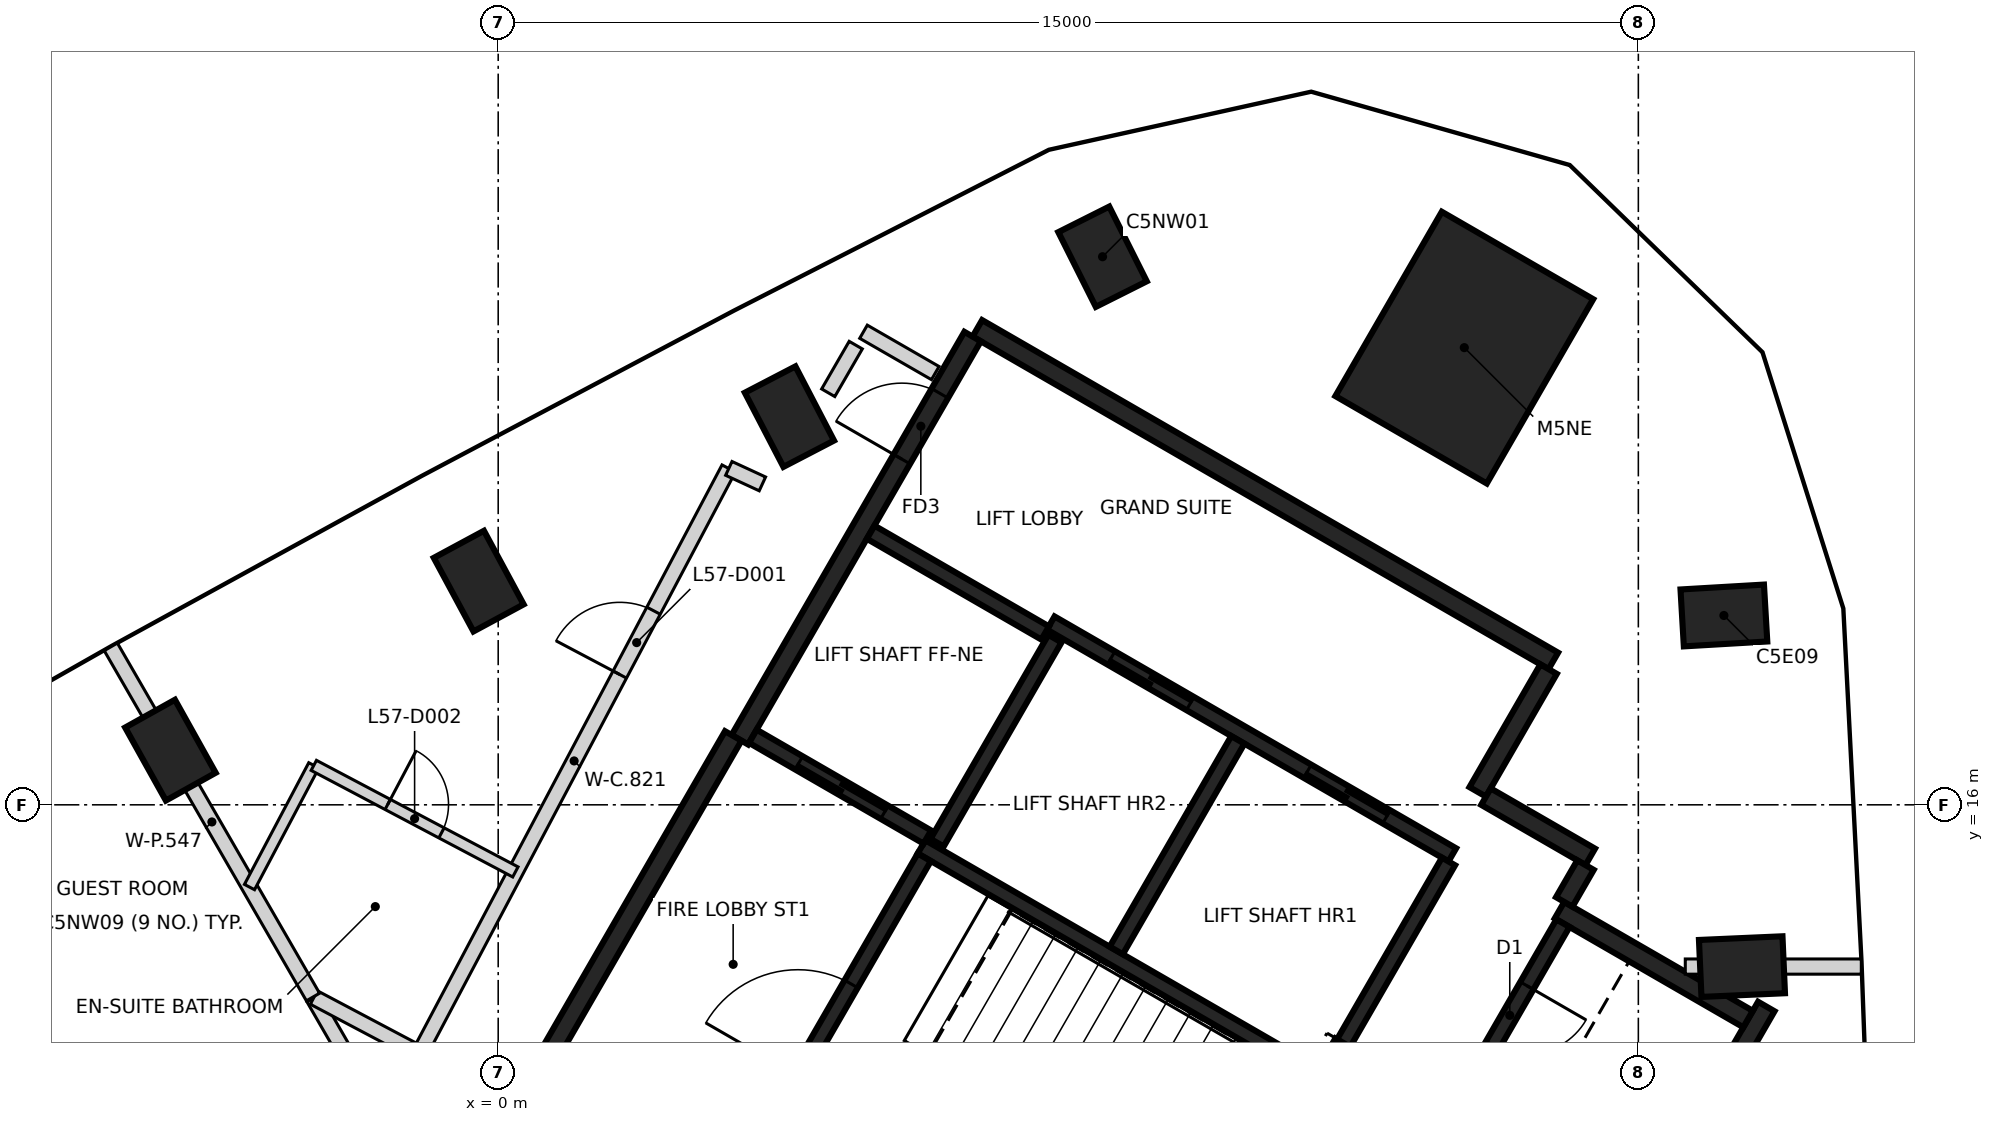
"""IFC4 building model, lengths in metres.
Left out: names, types, materials, properties, quantities, classifications, styles, units other than length and angle.
Written with IfcOpenShell. Run it as: python <this file> out.ifc"""

import sys

from ifc_helpers import new_model, si_unit, direction, frame, frame_2d, origin, origin_2d, place, context, subcontext, project, spatial, rectangle, extrude, element, fill, save


model = new_model("IFC4")
c1 = context("Model", 3, precision=1e-05, world=origin(), true_north=direction((0.0, 1.0)))
c2 = subcontext(c1, "Body", "Model", "MODEL_VIEW")
j1 = project(units=[si_unit("LENGTHUNIT", "METRE"), si_unit("PLANEANGLEUNIT", "RADIAN")], contexts=[c1])
p1 = place(None, origin())
s1 = spatial("IfcSite", under=j1, at=p1, CompositionType="ELEMENT")
p2 = place(p1, origin())
s2 = spatial("IfcBuilding", under=s1, at=p2, CompositionType="ELEMENT")
p3 = place(p2, frame((0.0, 0.0, 228.6)))
s3 = spatial("IfcBuildingStorey", under=s2, at=p3, CompositionType="ELEMENT", Elevation=228.6)
for number, where, z_axis, x_axis in (
    (1, (16.363, 13.872, -0.35), (0.0, 0.0, 1.0), (0.999, 0.044, 0.0)),
    (2, (16.125, 18.491, -0.35), (0.0, 0.0, 1.0), (0.998, 0.058, 0.0)),
    (3, (7.951, 23.211, -0.35), (0.0, 0.0, 1.0), (-0.449, 0.894, 0.0)),
    (4, (3.832, 21.107, -0.35), (0.0, 0.0, 1.0), (-0.461, 0.887, 0.0)),
    (5, (-0.256, 18.943, -0.35), (0.0, 0.0, 1.0), (-0.475, 0.88, 0.0)),
    (6, (-4.312, 16.719, -0.35), (0.0, 0.0, 1.0), (-0.487, 0.873, 0.0)),
):
    element("IfcColumn", number, at=place(p3, frame(where, z_axis=z_axis, x_axis=x_axis)), inside=s3, PredefinedType="COLUMN", context=c2, shape_type="SweptSolid", body=[
        extrude(rectangle(XDim=1.1, YDim=0.75, at=origin_2d()), origin(), (0.0, 0.0, 1.0), 3.6),
    ])
p4 = place(p3, frame((12.71, 22.015, -0.35), z_axis=(0.0, 0.0, 1.0), x_axis=(0.5, 0.866025403784, 0.0)))
e7 = element("IfcColumn", 7, at=p4, inside=s3, PredefinedType="COLUMN", context=c2, shape_type="SweptSolid", body=[
    extrude(rectangle(XDim=2.8, YDim=2.3, at=origin_2d()), origin(), (0.0, 0.0, 1.0), 3.6),
])
p5 = place(p3, frame((6.304, 22.269, 0.0), z_axis=(0.0, 0.0, 1.0), x_axis=(0.866022959057, -0.500004234368, 0.0)))
e8 = element("IfcWall", 8, at=p5, inside=s3, PredefinedType="SHEAR", context=c2, shape_type="SweptSolid", body=[
    extrude(rectangle(XDim=8.75, YDim=0.25, at=frame_2d((4.375, 0.0))), origin(), (0.0, 0.0, 1.0), 3.25),
])
p6 = place(p3, frame((3.179, 16.856, 0.0), z_axis=(0.0, 0.0, 1.0), x_axis=(0.500001955336, 0.866024274868, 0.0)))
e9 = element("IfcWall", 9, at=p6, inside=s3, PredefinedType="SHEAR", context=c2, shape_type="SweptSolid", body=[
    extrude(rectangle(XDim=6.125, YDim=0.25, at=frame_2d((3.062, 0.0))), origin(), (0.0, 0.0, 1.0), 3.25),
])
p7 = place(p6, frame((4.263, 0.0, 0.0)))
e10 = element("IfcOpeningElement", 10, at=p7, cuts=e9, PredefinedType="OPENING", context=c2, shape_type="SweptSolid", body=[
    extrude(rectangle(XDim=1.0, YDim=2.1, at=frame_2d((0.5, 1.05))), frame((0.0, 0.135, 0.0), z_axis=(0.0, -1.0, 0.0), x_axis=(1.0, 0.0, 0.0)), (0.0, 0.0, 1.0), 0.27),
])
p8 = place(p3, frame((0.48, 12.381, 0.0), z_axis=(0.0, 0.0, 1.0), x_axis=(0.49999885962, 0.866026062182, 0.0)))
e11 = element("IfcWall", 11, at=p8, inside=s3, PredefinedType="SHEAR", context=c2, shape_type="SweptSolid", body=[
    extrude(rectangle(XDim=5.225, YDim=0.25, at=frame_2d((2.612, 0.0))), origin(), (0.0, 0.0, 1.0), 3.25),
])
p9 = place(p3, frame((16.684, 13.347, 0.0), z_axis=(0.0, 0.0, 1.0), x_axis=(-0.499998874531, -0.866026053573, 0.0)))
e12 = element("IfcWall", 12, at=p9, inside=s3, PredefinedType="SHEAR", context=c2, shape_type="SweptSolid", body=[
    extrude(rectangle(XDim=3.313, YDim=0.25, at=frame_2d((1.656, 0.0))), origin(), (0.0, 0.0, 1.0), 3.25),
])
p10 = place(p3, frame((13.963, 14.614, 0.0), z_axis=(0.0, 0.0, 1.0), x_axis=(0.866042235819, -0.499970844928, 0.0)))
e13 = element("IfcWall", 13, at=p10, inside=s3, PredefinedType="SHEAR", context=c2, shape_type="SweptSolid", body=[
    extrude(rectangle(XDim=2.865, YDim=0.25, at=frame_2d((1.432, 0.0))), origin(), (0.0, 0.0, 1.0), 3.25),
])
p11 = place(p3, frame((13.819, 17.785, 0.0), z_axis=(0.0, 0.0, 1.0), x_axis=(-0.500039802285, -0.866002422705, 0.0)))
e14 = element("IfcWall", 14, at=p11, inside=s3, PredefinedType="SHEAR", context=c2, shape_type="SweptSolid", body=[
    extrude(rectangle(XDim=1.865, YDim=0.25, at=frame_2d((0.932, 0.0))), origin(), (0.0, 0.0, 1.0), 3.25),
])
p12 = place(p3, frame((12.433, 11.964, 0.0), z_axis=(0.0, 0.0, 1.0), x_axis=(-0.866038183914, 0.499977863513, 0.0)))
e15 = element("IfcWall", 15, at=p12, inside=s3, PredefinedType="SHEAR", context=c2, shape_type="SweptSolid", body=[
    extrude(rectangle(XDim=1.71, YDim=0.25, at=frame_2d((0.855, 0.0))), origin(), (0.0, 0.0, 1.0), 3.25),
])
p13 = place(p3, frame((12.995, 16.108, 0.0), z_axis=(0.0, 0.0, 1.0), x_axis=(0.866044474677, -0.49996696679, 0.0)))
e16 = element("IfcWall", 16, at=p13, inside=s3, PredefinedType="SHEAR", context=c2, shape_type="SweptSolid", body=[
    extrude(rectangle(XDim=1.584, YDim=0.25, at=frame_2d((0.792, 0.0))), origin(), (0.0, 0.0, 1.0), 3.25),
])
p14 = place(p3, frame((14.305, 15.207, 0.0), z_axis=(0.0, 0.0, 1.0), x_axis=(-0.499848422343, -0.866112899501, 0.0)))
e17 = element("IfcWall", 17, at=p14, inside=s3, PredefinedType="SHEAR", context=c2, shape_type="SweptSolid", body=[
    extrude(rectangle(XDim=0.559, YDim=0.25, at=frame_2d((0.28, 0.0))), origin(), (0.0, 0.0, 1.0), 3.25),
])
p15 = place(p3, frame((12.552, 15.342, 0.0), z_axis=(0.0, 0.0, 1.0), x_axis=(-0.866030299012, 0.499991521122, 0.0)))
e18 = element("IfcWall", 18, at=p15, inside=s3, PredefinedType="SHEAR", context=c2, shape_type="SweptSolid", body=[
    extrude(rectangle(XDim=6.1, YDim=0.2, at=frame_2d((3.05, 0.0))), origin(), (0.0, 0.0, 1.0), 3.25),
])
p16 = place(p15, frame((1.0, 0.0, 0.0)))
e19 = element("IfcOpeningElement", 19, at=p16, cuts=e18, PredefinedType="OPENING", context=c2, shape_type="SweptSolid", body=[
    extrude(rectangle(XDim=1.2, YDim=2.1, at=frame_2d((0.6, 1.05))), frame((0.0, 0.11, 0.0), z_axis=(0.0, -1.0, 0.0), x_axis=(1.0, 0.0, 0.0)), (0.0, 0.0, 1.0), 0.22),
])
p17 = place(p15, frame((3.982, 0.0, 0.0)))
e20 = element("IfcOpeningElement", 20, at=p17, cuts=e18, PredefinedType="OPENING", context=c2, shape_type="SweptSolid", body=[
    extrude(rectangle(XDim=1.2, YDim=2.1, at=frame_2d((0.6, 1.05))), frame((0.0, 0.11, 0.0), z_axis=(0.0, -1.0, 0.0), x_axis=(1.0, 0.0, 0.0)), (0.0, 0.0, 1.0), 0.22),
])
p18 = place(p3, frame((10.743, 12.46, 0.0), z_axis=(0.0, 0.0, 1.0), x_axis=(-0.866018848283, 0.500011354289, 0.0)))
e21 = element("IfcWall", 21, at=p18, inside=s3, PredefinedType="SHEAR", context=c2, shape_type="SweptSolid", body=[
    extrude(rectangle(XDim=5.974, YDim=0.2, at=frame_2d((2.987, 0.0))), origin(), (0.0, 0.0, 1.0), 3.25),
])
p19 = place(p3, frame((3.057, 10.895, 0.0), z_axis=(0.0, 0.0, 1.0), x_axis=(0.500027839223, 0.866009330205, 0.0)))
e22 = element("IfcWall", 22, at=p19, inside=s3, PredefinedType="SHEAR", context=c2, shape_type="SweptSolid", body=[
    extrude(rectangle(XDim=5.098, YDim=0.2, at=frame_2d((2.549, 0.0))), origin(), (0.0, 0.0, 1.0), 3.25),
])
p20 = place(p19, frame((1.774, 0.0, 0.0)))
e23 = element("IfcOpeningElement", 23, at=p20, cuts=e22, PredefinedType="OPENING", context=c2, shape_type="SweptSolid", body=[
    extrude(rectangle(XDim=1.4, YDim=2.1, at=frame_2d((0.7, 1.05))), frame((0.0, 0.11, 0.0), z_axis=(0.0, -1.0, 0.0), x_axis=(1.0, 0.0, 0.0)), (0.0, 0.0, 1.0), 0.22),
])
p21 = place(p3, frame((8.132, 14.084, 0.0), z_axis=(0.0, 0.0, 1.0), x_axis=(0.500030834389, 0.86600760081, 0.0)))
e24 = element("IfcWall", 24, at=p21, inside=s3, PredefinedType="SHEAR", context=c2, shape_type="SweptSolid", body=[
    extrude(rectangle(XDim=3.198, YDim=0.2, at=frame_2d((1.599, 0.0))), origin(), (0.0, 0.0, 1.0), 3.25),
])
p22 = place(p3, frame((14.008, 14.442, 0.0), z_axis=(0.0, 0.0, 1.0), x_axis=(-0.499986818241, -0.866033014143, 0.0)))
e25 = element("IfcWall", 25, at=p22, inside=s3, PredefinedType="SHEAR", context=c2, shape_type="SweptSolid", body=[
    extrude(rectangle(XDim=2.798, YDim=0.2, at=frame_2d((1.399, 0.0))), origin(), (0.0, 0.0, 1.0), 3.25),
])
p23 = place(p22, frame((0.949, 0.0, 0.0)))
e26 = element("IfcOpeningElement", 26, at=p23, cuts=e25, PredefinedType="OPENING", context=c2, shape_type="SweptSolid", body=[
    extrude(rectangle(XDim=0.9, YDim=2.1, at=frame_2d((0.45, 1.05))), frame((0.0, 0.11, 0.0), z_axis=(0.0, -1.0, 0.0), x_axis=(1.0, 0.0, 0.0)), (0.0, 0.0, 1.0), 0.22),
])
p24 = place(p3, frame((12.502, 15.255, 0.0), z_axis=(0.0, 0.0, 1.0), x_axis=(-0.499965018551, -0.866045599391, 0.0)))
e27 = element("IfcWall", 27, at=p24, inside=s3, PredefinedType="SHEAR", context=c2, shape_type="SweptSolid", body=[
    extrude(rectangle(XDim=2.759, YDim=0.2, at=frame_2d((1.379, 0.0))), origin(), (0.0, 0.0, 1.0), 3.25),
])
p25 = place(p3, frame((7.324, 18.187, 0.0), z_axis=(0.0, 0.0, 1.0), x_axis=(-0.499967891604, -0.866043940782, 0.0)))
e28 = element("IfcWall", 28, at=p25, inside=s3, PredefinedType="SHEAR", context=c2, shape_type="SweptSolid", body=[
    extrude(rectangle(XDim=3.1, YDim=0.2, at=frame_2d((1.55, 0.0))), origin(), (0.0, 0.0, 1.0), 3.25),
])
p26 = place(p3, frame((5.646, 15.576, 0.0), z_axis=(0.0, 0.0, 1.0), x_axis=(-0.866018407898, 0.500012117035, 0.0)))
e29 = element("IfcWall", 29, at=p26, inside=s3, PredefinedType="SHEAR", context=c2, shape_type="SweptSolid", body=[
    extrude(rectangle(XDim=2.651, YDim=0.2, at=frame_2d((1.325, 0.0))), origin(), (0.0, 0.0, 1.0), 3.25),
])
p27 = place(p26, frame((0.652, 0.0, 0.0)))
e30 = element("IfcOpeningElement", 30, at=p27, cuts=e29, PredefinedType="OPENING", context=c2, shape_type="SweptSolid", body=[
    extrude(rectangle(XDim=1.3, YDim=2.1, at=frame_2d((0.65, 1.05))), frame((0.0, 0.11, 0.0), z_axis=(0.0, -1.0, 0.0), x_axis=(1.0, 0.0, 0.0)), (0.0, 0.0, 1.0), 0.22),
])
p28 = place(p3, frame((7.196, 18.26, 0.0), z_axis=(0.0, 0.0, 1.0), x_axis=(-0.866018407898, 0.500012117035, 0.0)))
e31 = element("IfcWall", 31, at=p28, inside=s3, PredefinedType="SHEAR", context=c2, shape_type="SweptSolid", body=[
    extrude(rectangle(XDim=2.651, YDim=0.2, at=frame_2d((1.325, 0.0))), origin(), (0.0, 0.0, 1.0), 3.25),
])
p29 = place(p3, frame((-2.43, 13.459, 0.0), z_axis=(0.0, 0.0, 1.0), x_axis=(0.499957265187, -0.866050075334, 0.0)))
e32 = element("IfcWall", 32, at=p29, inside=s3, PredefinedType="PARTITIONING", context=c2, shape_type="SweptSolid", body=[
    extrude(rectangle(XDim=6.87, YDim=0.2, at=frame_2d((3.435, 0.0))), origin(), (0.0, 0.0, 1.0), 3.25),
])
p30 = place(p29, frame((3.275, 0.0, 0.0)))
e33 = element("IfcOpeningElement", 33, at=p30, cuts=e32, PredefinedType="OPENING", context=c2, shape_type="SweptSolid", body=[
    extrude(rectangle(XDim=1.0, YDim=2.1, at=frame_2d((0.5, 1.05))), frame((0.0, 0.11, 0.0), z_axis=(0.0, -1.0, 0.0), x_axis=(1.0, 0.0, 0.0)), (0.0, 0.0, 1.0), 0.22),
])
p31 = place(p3, frame((-2.425, 13.465, 0.0), z_axis=(0.0, 0.0, 1.0), x_axis=(0.883874806572, -0.467723557572, 0.0)))
e34 = element("IfcWall", 34, at=p31, inside=s3, PredefinedType="PARTITIONING", context=c2, shape_type="SweptSolid", body=[
    extrude(rectangle(XDim=1.572, YDim=0.2, at=frame_2d((0.786, 0.0))), origin(), (0.0, 0.0, 1.0), 3.25),
])
p32 = place(p3, frame((-1.035, 12.73, 0.0), z_axis=(0.0, 0.0, 1.0), x_axis=(0.46738248691, 0.884055208078, 0.0)))
e35 = element("IfcWall", 35, at=p32, inside=s3, PredefinedType="PARTITIONING", context=c2, shape_type="SweptSolid", body=[
    extrude(rectangle(XDim=8.705, YDim=0.2, at=frame_2d((4.352, 0.0))), origin(), (0.0, 0.0, 1.0), 3.25),
])
p33 = place(p32, frame((5.638, 0.0, 0.0)))
e36 = element("IfcOpeningElement", 36, at=p33, cuts=e35, PredefinedType="OPENING", context=c2, shape_type="SweptSolid", body=[
    extrude(rectangle(XDim=0.95, YDim=2.1, at=frame_2d((0.475, 1.05))), frame((0.0, 0.11, 0.0), z_axis=(0.0, -1.0, 0.0), x_axis=(1.0, 0.0, 0.0)), (0.0, 0.0, 1.0), 0.22),
])
p34 = place(p3, frame((3.034, 20.426, 0.0), z_axis=(0.0, 0.0, 1.0), x_axis=(0.907930035436, -0.41912176125, 0.0)))
e37 = element("IfcWall", 37, at=p34, inside=s3, PredefinedType="PARTITIONING", context=c2, shape_type="SweptSolid", body=[
    extrude(rectangle(XDim=0.487, YDim=0.2, at=frame_2d((0.244, 0.0))), origin(), (0.0, 0.0, 1.0), 3.25),
])
p35 = place(p3, frame((4.342, 21.421, 0.0), z_axis=(0.0, 0.0, 1.0), x_axis=(0.500238258503, 0.865887801468, 0.0)))
e38 = element("IfcWall", 38, at=p35, inside=s3, PredefinedType="PARTITIONING", context=c2, shape_type="SweptSolid", body=[
    extrude(rectangle(XDim=0.724, YDim=0.2, at=frame_2d((0.362, 0.0))), origin(), (0.0, 0.0, 1.0), 2.35),
])
p36 = place(p3, frame((4.806, 22.224, 0.0), z_axis=(0.0, 0.0, 1.0), x_axis=(0.866334698307, -0.499463903109, 0.0)))
e39 = element("IfcWall", 39, at=p36, inside=s3, PredefinedType="PARTITIONING", context=c2, shape_type="SweptSolid", body=[
    extrude(rectangle(XDim=1.09, YDim=0.2, at=frame_2d((0.545, 0.0))), origin(), (0.0, 0.0, 1.0), 2.35),
])
p37 = place(p3, frame((-9.119, 15.795, 0.0), z_axis=(0.0, 0.0, 1.0), x_axis=(0.50001601051, -0.866016159915, 0.0)))
e40 = element("IfcWall", 40, at=p37, inside=s3, PredefinedType="PARTITIONING", context=c2, shape_type="SweptSolid", body=[
    extrude(rectangle(XDim=12.238, YDim=0.2, at=frame_2d((6.119, 0.0))), origin(), (0.0, 0.0, 1.0), 3.25),
])
p38 = place(p3, frame((-5.097, 18.078, 0.0), z_axis=(0.0, 0.0, 1.0), x_axis=(0.50004820116, -0.865997573043, 0.0)))
e41 = element("IfcWall", 41, at=p38, inside=s3, PredefinedType="PARTITIONING", context=c2, shape_type="SweptSolid", body=[
    extrude(rectangle(XDim=5.32, YDim=0.2, at=frame_2d((2.66, 0.0))), origin(), (0.0, 0.0, 1.0), 3.25),
])
p39 = place(p3, frame((15.618, 13.872, 0.0), z_axis=(0.0, 0.0, 1.0), x_axis=(1.0, 0.0, 0.0)))
e42 = element("IfcWall", 42, at=p39, inside=s3, PredefinedType="PARTITIONING", context=c2, shape_type="SweptSolid", body=[
    extrude(rectangle(XDim=2.316, YDim=0.2, at=frame_2d((1.158, 0.0))), origin(), (0.0, 0.0, 1.0), 3.25),
])
p40 = place(p3, frame((-3.272, 14.918, 0.0), z_axis=(0.0, 0.0, 1.0), x_axis=(0.467162796658, 0.884171319043, 0.0)))
e43 = element("IfcWall", 43, at=p40, inside=s3, PredefinedType="PARTITIONING", context=c2, shape_type="SweptSolid", body=[
    extrude(rectangle(XDim=1.811, YDim=0.15, at=frame_2d((0.905, 0.0))), origin(), (0.0, 0.0, 1.0), 3.25),
])
p41 = place(p3, frame((-2.426, 16.519, 0.0), z_axis=(0.0, 0.0, 1.0), x_axis=(0.884056991815, -0.467379112952, 0.0)))
e44 = element("IfcWall", 44, at=p41, inside=s3, PredefinedType="PARTITIONING", context=c2, shape_type="SweptSolid", body=[
    extrude(rectangle(XDim=3.0, YDim=0.15, at=frame_2d((1.5, 0.0))), origin(), (0.0, 0.0, 1.0), 3.25),
])
p42 = place(p41, frame((1.1, 0.0, 0.0)))
e45 = element("IfcOpeningElement", 45, at=p42, cuts=e44, PredefinedType="OPENING", context=c2, shape_type="SweptSolid", body=[
    extrude(rectangle(XDim=0.8, YDim=2.1, at=frame_2d((0.4, 1.05))), frame((0.0, 0.085, 0.0), z_axis=(0.0, -1.0, 0.0), x_axis=(1.0, 0.0, 0.0)), (0.0, 0.0, 1.0), 0.17),
])
p43 = place(p27, origin())
e46 = element("IfcDoor", 46, at=p43, inside=s3, OperationType="SLIDING_TO_LEFT", PredefinedType="DOOR", context=c2, shape_type="SweptSolid", body=[
    extrude(rectangle(XDim=1.3, YDim=2.1, at=frame_2d((0.65, 1.05))), frame((0.0, 0.025, 0.0), z_axis=(0.0, -1.0, 0.0), x_axis=(1.0, 0.0, 0.0)), (0.0, 0.0, 1.0), 0.05),
])
fill(e30, e46)
p44 = place(p16, origin())
e47 = element("IfcDoor", 47, at=p44, inside=s3, OperationType="DOUBLE_DOOR_SLIDING", PredefinedType="DOOR", context=c2, shape_type="SweptSolid", body=[
    extrude(rectangle(XDim=1.2, YDim=2.1, at=frame_2d((0.6, 1.05))), frame((0.0, 0.025, 0.0), z_axis=(0.0, -1.0, 0.0), x_axis=(1.0, 0.0, 0.0)), (0.0, 0.0, 1.0), 0.05),
])
fill(e19, e47)
p45 = place(p17, origin())
e48 = element("IfcDoor", 48, at=p45, inside=s3, OperationType="DOUBLE_DOOR_SLIDING", PredefinedType="DOOR", context=c2, shape_type="SweptSolid", body=[
    extrude(rectangle(XDim=1.2, YDim=2.1, at=frame_2d((0.6, 1.05))), frame((0.0, 0.025, 0.0), z_axis=(0.0, -1.0, 0.0), x_axis=(1.0, 0.0, 0.0)), (0.0, 0.0, 1.0), 0.05),
])
fill(e20, e48)
p46 = place(p7, origin())
e49 = element("IfcDoor", 49, at=p46, inside=s3, OperationType="SINGLE_SWING_LEFT", PredefinedType="DOOR", context=c2, shape_type="SweptSolid", body=[
    extrude(rectangle(XDim=1.0, YDim=2.1, at=frame_2d((0.5, 1.05))), frame((0.0, 0.025, 0.0), z_axis=(0.0, -1.0, 0.0), x_axis=(1.0, 0.0, 0.0)), (0.0, 0.0, 1.0), 0.05),
])
fill(e10, e49)
p47 = place(p20, origin())
e50 = element("IfcDoor", 50, at=p47, inside=s3, OperationType="SINGLE_SWING_LEFT", PredefinedType="DOOR", context=c2, shape_type="SweptSolid", body=[
    extrude(rectangle(XDim=1.4, YDim=2.1, at=frame_2d((0.7, 1.05))), frame((0.0, 0.025, 0.0), z_axis=(0.0, -1.0, 0.0), x_axis=(1.0, 0.0, 0.0)), (0.0, 0.0, 1.0), 0.05),
])
fill(e23, e50)
p48 = place(p23, origin())
e51 = element("IfcDoor", 51, at=p48, inside=s3, OperationType="SINGLE_SWING_RIGHT", PredefinedType="DOOR", context=c2, shape_type="SweptSolid", body=[
    extrude(rectangle(XDim=0.9, YDim=2.1, at=frame_2d((0.45, 1.05))), frame((0.0, 0.025, 0.0), z_axis=(0.0, -1.0, 0.0), x_axis=(1.0, 0.0, 0.0)), (0.0, 0.0, 1.0), 0.05),
])
fill(e26, e51)
p49 = place(p33, frame((0.95, 0.0, 0.0), z_axis=(0.0, 0.0, 1.0), x_axis=(-1.0, 0.0, 0.0)))
e52 = element("IfcDoor", 52, at=p49, inside=s3, OperationType="SINGLE_SWING_LEFT", PredefinedType="DOOR", context=c2, shape_type="SweptSolid", body=[
    extrude(rectangle(XDim=0.95, YDim=2.1, at=frame_2d((0.475, 1.05))), frame((0.0, 0.025, 0.0), z_axis=(0.0, -1.0, 0.0), x_axis=(1.0, 0.0, 0.0)), (0.0, 0.0, 1.0), 0.05),
])
fill(e36, e52)
p50 = place(p42, origin())
e53 = element("IfcDoor", 53, at=p50, inside=s3, OperationType="SINGLE_SWING_LEFT", PredefinedType="DOOR", context=c2, shape_type="SweptSolid", body=[
    extrude(rectangle(XDim=0.8, YDim=2.1, at=frame_2d((0.4, 1.05))), frame((0.0, 0.025, 0.0), z_axis=(0.0, -1.0, 0.0), x_axis=(1.0, 0.0, 0.0)), (0.0, 0.0, 1.0), 0.05),
])
fill(e45, e53)
save(model, sys.argv[1])
